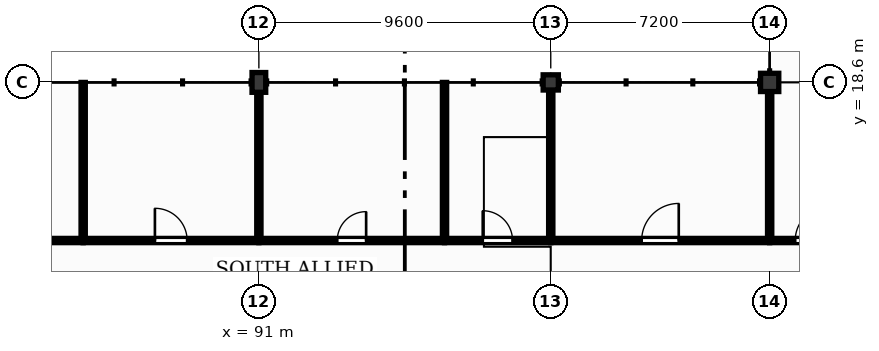
"""IFC4 building model, lengths in metres.
Left out: names, types, materials, properties, quantities, classifications, styles, units other than length and angle.
Written with IfcOpenShell. Run it as: python <this file> out.ifc"""

import sys

from ifc_helpers import new_model, si_unit, direction, frame, frame_2d, origin, origin_2d, place, context, subcontext, project, spatial, rectangle, extrude, element, fill, save


model = new_model("IFC4")
c1 = context("Model", 3, precision=1e-05, world=origin(), true_north=direction((0.0, 1.0)))
c2 = subcontext(c1, "Body", "Model", "MODEL_VIEW")
j1 = project(units=[si_unit("LENGTHUNIT", "METRE"), si_unit("PLANEANGLEUNIT", "RADIAN")], contexts=[c1])
p1 = place(None, origin())
s1 = spatial("IfcSite", under=j1, at=p1, CompositionType="ELEMENT")
p2 = place(p1, origin())
s2 = spatial("IfcBuilding", under=s1, at=p2, CompositionType="ELEMENT")
p3 = place(p2, origin())
s3 = spatial("IfcBuildingStorey", under=s2, at=p3, CompositionType="ELEMENT", Elevation=0.0)
p4 = place(p3, frame((91.0, 18.6, 0.0), z_axis=(0.0, 0.0, 1.0), x_axis=(1.0, 0.0, 0.0)))
e1 = element("IfcColumn", 1, at=p4, inside=s3, PredefinedType="COLUMN", context=c2, shape_type="SweptSolid", body=[
    extrude(rectangle(XDim=0.45, YDim=0.65, at=origin_2d()), origin(), (0.0, 0.0, 1.0), 4.2),
])
p5 = place(p3, frame((100.6, 18.6, 0.0), z_axis=(0.0, 0.0, 1.0), x_axis=(1.0, 0.0, 0.0)))
e2 = element("IfcColumn", 2, at=p5, inside=s3, PredefinedType="COLUMN", context=c2, shape_type="SweptSolid", body=[
    extrude(rectangle(XDim=0.5, YDim=0.5, at=origin_2d()), origin(), (0.0, 0.0, 1.0), 4.2),
])
p6 = place(p3, frame((107.8, 18.6, 0.0), z_axis=(0.0, 0.0, 1.0), x_axis=(1.0, 0.0, 0.0)))
e3 = element("IfcColumn", 3, at=p6, inside=s3, PredefinedType="COLUMN", context=c2, shape_type="SweptSolid", body=[
    extrude(rectangle(XDim=0.6, YDim=0.6, at=origin_2d()), origin(), (0.0, 0.0, 1.0), 4.2),
])
p7 = place(p3, frame((81.4, 13.4, 0.0), z_axis=(0.0, 0.0, 1.0), x_axis=(1.0, 0.0, 0.0)))
e4 = element("IfcWall", 4, at=p7, inside=s3, PredefinedType="PARTITIONING", context=c2, shape_type="SweptSolid", body=[
    extrude(rectangle(XDim=3.821, YDim=0.14, at=frame_2d((1.911, 0.0))), origin(), (0.0, 0.0, 1.0), 4.18),
])
p8 = place(p7, frame((1.42, 0.0, 0.0)))
e5 = element("IfcOpeningElement", 5, at=p8, cuts=e4, PredefinedType="OPENING", context=c2, shape_type="SweptSolid", body=[
    extrude(rectangle(XDim=0.98, YDim=2.15, at=frame_2d((0.49, 1.075))), frame((0.0, 0.08, 0.0), z_axis=(0.0, -1.0, 0.0), x_axis=(1.0, 0.0, 0.0)), (0.0, 0.0, 1.0), 0.16),
])
p9 = place(p3, frame((85.221, 13.47, 0.0), z_axis=(0.0, 0.0, 1.0), x_axis=(0.0, 1.0, 0.0)))
e6 = element("IfcWall", 6, at=p9, inside=s3, PredefinedType="PARTITIONING", context=c2, shape_type="SweptSolid", body=[
    extrude(rectangle(XDim=5.13, YDim=0.14, at=frame_2d((2.565, 0.0))), origin(), (0.0, 0.0, 1.0), 4.18),
])
p10 = place(p3, frame((85.221, 13.4, 0.0), z_axis=(0.0, 0.0, 1.0), x_axis=(1.0, 0.0, 0.0)))
e7 = element("IfcWall", 7, at=p10, inside=s3, PredefinedType="PARTITIONING", context=c2, shape_type="SweptSolid", body=[
    extrude(rectangle(XDim=5.779, YDim=0.14, at=frame_2d((2.89, 0.0))), origin(), (0.0, 0.0, 1.0), 4.18),
])
p11 = place(p10, frame((2.36, 0.0, 0.0)))
e8 = element("IfcOpeningElement", 8, at=p11, cuts=e7, PredefinedType="OPENING", context=c2, shape_type="SweptSolid", body=[
    extrude(rectangle(XDim=1.06, YDim=2.15, at=frame_2d((0.53, 1.075))), frame((0.0, 0.08, 0.0), z_axis=(0.0, -1.0, 0.0), x_axis=(1.0, 0.0, 0.0)), (0.0, 0.0, 1.0), 0.16),
])
p12 = place(p3, frame((91.0, 13.47, 0.0), z_axis=(0.0, 0.0, 1.0), x_axis=(0.0, 1.0, 0.0)))
e9 = element("IfcWall", 9, at=p12, inside=s3, PredefinedType="PARTITIONING", context=c2, shape_type="SweptSolid", body=[
    extrude(rectangle(XDim=4.805, YDim=0.14, at=frame_2d((2.402, 0.0))), origin(), (0.0, 0.0, 1.0), 3.5),
])
p13 = place(p3, frame((91.0, 13.4, 0.0), z_axis=(0.0, 0.0, 1.0), x_axis=(1.0, 0.0, 0.0)))
e10 = element("IfcWall", 10, at=p13, inside=s3, PredefinedType="PARTITIONING", context=c2, shape_type="SweptSolid", body=[
    extrude(rectangle(XDim=6.106, YDim=0.14, at=frame_2d((3.053, 0.0))), origin(), (0.0, 0.0, 1.0), 4.18),
])
p14 = place(p13, frame((2.578, 0.0, 0.0)))
e11 = element("IfcOpeningElement", 11, at=p14, cuts=e10, PredefinedType="OPENING", context=c2, shape_type="SweptSolid", body=[
    extrude(rectangle(XDim=0.95, YDim=2.1, at=frame_2d((0.475, 1.05))), frame((0.0, 0.08, 0.0), z_axis=(0.0, -1.0, 0.0), x_axis=(1.0, 0.0, 0.0)), (0.0, 0.0, 1.0), 0.16),
])
p15 = place(p3, frame((97.106, 13.47, 0.0), z_axis=(0.0, 0.0, 1.0), x_axis=(0.0, 1.0, 0.0)))
e12 = element("IfcWall", 12, at=p15, inside=s3, PredefinedType="PARTITIONING", context=c2, shape_type="SweptSolid", body=[
    extrude(rectangle(XDim=5.13, YDim=0.14, at=frame_2d((2.565, 0.0))), origin(), (0.0, 0.0, 1.0), 4.18),
])
p16 = place(p3, frame((97.106, 13.4, 0.0), z_axis=(0.0, 0.0, 1.0), x_axis=(1.0, 0.0, 0.0)))
e13 = element("IfcWall", 13, at=p16, inside=s3, PredefinedType="PARTITIONING", context=c2, shape_type="SweptSolid", body=[
    extrude(rectangle(XDim=3.494, YDim=0.14, at=frame_2d((1.747, 0.0))), origin(), (0.0, 0.0, 1.0), 4.18),
])
p17 = place(p16, frame((1.257, 0.0, 0.0)))
e14 = element("IfcOpeningElement", 14, at=p17, cuts=e13, PredefinedType="OPENING", context=c2, shape_type="SweptSolid", body=[
    extrude(rectangle(XDim=0.98, YDim=2.15, at=frame_2d((0.49, 1.075))), frame((0.0, 0.08, 0.0), z_axis=(0.0, -1.0, 0.0), x_axis=(1.0, 0.0, 0.0)), (0.0, 0.0, 1.0), 0.16),
])
p18 = place(p3, frame((100.6, 13.47, 0.0), z_axis=(0.0, 0.0, 1.0), x_axis=(0.0, 1.0, 0.0)))
e15 = element("IfcWall", 15, at=p18, inside=s3, PredefinedType="PARTITIONING", context=c2, shape_type="SweptSolid", body=[
    extrude(rectangle(XDim=4.88, YDim=0.14, at=frame_2d((2.44, 0.0))), origin(), (0.0, 0.0, 1.0), 3.5),
])
p19 = place(p3, frame((100.6, 13.4, 0.0), z_axis=(0.0, 0.0, 1.0), x_axis=(1.0, 0.0, 0.0)))
e16 = element("IfcWall", 16, at=p19, inside=s3, PredefinedType="PARTITIONING", context=c2, shape_type="SweptSolid", body=[
    extrude(rectangle(XDim=7.2, YDim=0.14, at=frame_2d((3.6, 0.0))), origin(), (0.0, 0.0, 1.0), 4.18),
])
p20 = place(p19, frame((2.99, 0.0, 0.0)))
e17 = element("IfcOpeningElement", 17, at=p20, cuts=e16, PredefinedType="OPENING", context=c2, shape_type="SweptSolid", body=[
    extrude(rectangle(XDim=1.22, YDim=2.1, at=frame_2d((0.61, 1.05))), frame((0.0, 0.08, 0.0), z_axis=(0.0, -1.0, 0.0), x_axis=(1.0, 0.0, 0.0)), (0.0, 0.0, 1.0), 0.16),
])
p21 = place(p3, frame((107.8, 13.47, 0.0), z_axis=(0.0, 0.0, 1.0), x_axis=(0.0, 1.0, 0.0)))
e18 = element("IfcWall", 18, at=p21, inside=s3, PredefinedType="PARTITIONING", context=c2, shape_type="SweptSolid", body=[
    extrude(rectangle(XDim=4.83, YDim=0.14, at=frame_2d((2.415, 0.0))), origin(), (0.0, 0.0, 1.0), 3.5),
])
p22 = place(p3, frame((107.8, 13.4, 0.0), z_axis=(0.0, 0.0, 1.0), x_axis=(1.0, 0.0, 0.0)))
e19 = element("IfcWall", 19, at=p22, inside=s3, PredefinedType="PARTITIONING", context=c2, shape_type="SweptSolid", body=[
    extrude(rectangle(XDim=2.8, YDim=0.14, at=frame_2d((1.4, 0.0))), origin(), (0.0, 0.0, 1.0), 4.18),
])
p23 = place(p22, frame((0.84, 0.0, 0.0)))
e20 = element("IfcOpeningElement", 20, at=p23, cuts=e19, PredefinedType="OPENING", context=c2, shape_type="SweptSolid", body=[
    extrude(rectangle(XDim=1.12, YDim=2.15, at=frame_2d((0.56, 1.075))), frame((0.0, 0.08, 0.0), z_axis=(0.0, -1.0, 0.0), x_axis=(1.0, 0.0, 0.0)), (0.0, 0.0, 1.0), 0.16),
])
p24 = place(p23, origin())
e21 = element("IfcDoor", 21, at=p24, inside=s3, OperationType="SINGLE_SWING_RIGHT", PredefinedType="DOOR", context=c2, shape_type="SweptSolid", body=[
    extrude(rectangle(XDim=1.12, YDim=2.15, at=frame_2d((0.56, 1.075))), frame((0.0, 0.025, 0.0), z_axis=(0.0, -1.0, 0.0), x_axis=(1.0, 0.0, 0.0)), (0.0, 0.0, 1.0), 0.05),
])
fill(e20, e21)
p25 = place(p11, origin())
e22 = element("IfcDoor", 22, at=p25, inside=s3, OperationType="SINGLE_SWING_LEFT", PredefinedType="DOOR", context=c2, shape_type="SweptSolid", body=[
    extrude(rectangle(XDim=1.06, YDim=2.15, at=frame_2d((0.53, 1.075))), frame((0.0, 0.025, 0.0), z_axis=(0.0, -1.0, 0.0), x_axis=(1.0, 0.0, 0.0)), (0.0, 0.0, 1.0), 0.05),
])
fill(e8, e22)
p26 = place(p14, origin())
e23 = element("IfcDoor", 23, at=p26, inside=s3, OperationType="SINGLE_SWING_RIGHT", PredefinedType="DOOR", context=c2, shape_type="SweptSolid", body=[
    extrude(rectangle(XDim=0.95, YDim=2.1, at=frame_2d((0.475, 1.05))), frame((0.0, 0.025, 0.0), z_axis=(0.0, -1.0, 0.0), x_axis=(1.0, 0.0, 0.0)), (0.0, 0.0, 1.0), 0.05),
])
fill(e11, e23)
p27 = place(p17, origin())
e24 = element("IfcDoor", 24, at=p27, inside=s3, OperationType="SINGLE_SWING_LEFT", PredefinedType="DOOR", context=c2, shape_type="SweptSolid", body=[
    extrude(rectangle(XDim=0.98, YDim=2.15, at=frame_2d((0.49, 1.075))), frame((0.0, 0.025, 0.0), z_axis=(0.0, -1.0, 0.0), x_axis=(1.0, 0.0, 0.0)), (0.0, 0.0, 1.0), 0.05),
])
fill(e14, e24)
p28 = place(p20, origin())
e25 = element("IfcDoor", 25, at=p28, inside=s3, OperationType="SINGLE_SWING_RIGHT", PredefinedType="DOOR", context=c2, shape_type="SweptSolid", body=[
    extrude(rectangle(XDim=1.22, YDim=2.1, at=frame_2d((0.61, 1.05))), frame((0.0, 0.025, 0.0), z_axis=(0.0, -1.0, 0.0), x_axis=(1.0, 0.0, 0.0)), (0.0, 0.0, 1.0), 0.05),
])
fill(e17, e25)
save(model, sys.argv[1])
